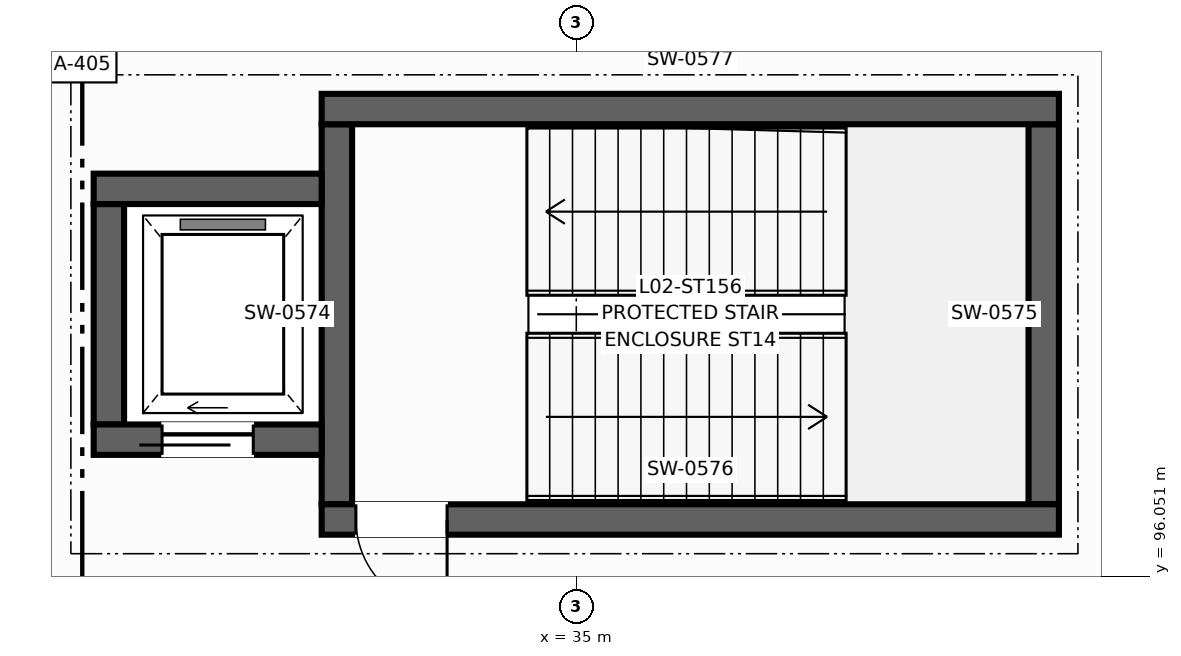
"""IFC4 building model, lengths in metres.
Left out: names, types, materials, properties, quantities, classifications, styles, units other than length and angle.
Written with IfcOpenShell. Run it as: python <this file> out.ifc"""

import sys

from ifc_helpers import new_model, si_unit, direction, frame, frame_2d, origin, place, context, subcontext, project, spatial, rectangle, extrude, element, fill, save


model = new_model("IFC4")
c1 = context("Model", 3, precision=1e-05, world=origin(), true_north=direction((0.0, 1.0)))
c2 = subcontext(c1, "Body", "Model", "MODEL_VIEW")
j1 = project(units=[si_unit("LENGTHUNIT", "METRE"), si_unit("PLANEANGLEUNIT", "RADIAN")], contexts=[c1])
p1 = place(None, origin())
s1 = spatial("IfcSite", under=j1, at=p1, CompositionType="ELEMENT")
p2 = place(p1, origin())
s2 = spatial("IfcBuilding", under=s1, at=p2, CompositionType="ELEMENT")
p3 = place(p2, frame((0.0, 0.0, 9.0)))
s3 = spatial("IfcBuildingStorey", under=s2, at=p3, CompositionType="ELEMENT", Elevation=9.0)
for number, where, z_axis, x_axis in (
    (1, (31.85, 97.0, 0.0), (0.0, 0.0, 1.0), (0.0, 1.0, 0.0)),
    (2, (41.15, 97.0, 0.0), (0.0, 0.0, 1.0), (0.0, 1.0, 0.0)),
):
    element("IfcWall", number, at=place(p3, frame(where, z_axis=z_axis, x_axis=x_axis)), inside=s3, PredefinedType="SHEAR", context=c2, shape_type="SweptSolid", body=[
        extrude(rectangle(XDim=5.0, YDim=0.4, at=frame_2d((2.5, 0.0))), origin(), (0.0, 0.0, 1.0), 4.185),
    ])
p4 = place(p3, frame((31.65, 96.8, 0.0), z_axis=(0.0, 0.0, 1.0), x_axis=(1.0, 0.0, 0.0)))
e3 = element("IfcWall", 3, at=p4, inside=s3, PredefinedType="SHEAR", context=c2, shape_type="SweptSolid", body=[
    extrude(rectangle(XDim=9.7, YDim=0.4, at=frame_2d((4.85, 0.0))), origin(), (0.0, 0.0, 1.0), 4.185),
])
p5 = place(p4, frame((0.45, 0.0, 0.0)))
e4 = element("IfcOpeningElement", 4, at=p5, cuts=e3, PredefinedType="OPENING", context=c2, shape_type="SweptSolid", body=[
    extrude(rectangle(XDim=1.2, YDim=2.2, at=frame_2d((0.6, 1.1))), frame((0.0, 0.21, 0.0), z_axis=(0.0, -1.0, 0.0), x_axis=(1.0, 0.0, 0.0)), (0.0, 0.0, 1.0), 0.42),
])
p6 = place(p3, frame((31.65, 102.2, 0.0), z_axis=(0.0, 0.0, 1.0), x_axis=(1.0, 0.0, 0.0)))
e5 = element("IfcWall", 5, at=p6, inside=s3, PredefinedType="SHEAR", context=c2, shape_type="SweptSolid", body=[
    extrude(rectangle(XDim=9.7, YDim=0.4, at=frame_2d((4.85, 0.0))), origin(), (0.0, 0.0, 1.0), 4.185),
])
p7 = place(p3, frame((28.85, 98.05, 0.0), z_axis=(0.0, 0.0, 1.0), x_axis=(0.0, 1.0, 0.0)))
e6 = element("IfcWall", 6, at=p7, inside=s3, PredefinedType="SHEAR", context=c2, shape_type="SweptSolid", body=[
    extrude(rectangle(XDim=2.9, YDim=0.4, at=frame_2d((1.45, 0.0))), origin(), (0.0, 0.0, 1.0), 4.185),
])
p8 = place(p3, frame((28.65, 97.85, 0.0), z_axis=(0.0, 0.0, 1.0), x_axis=(1.0, 0.0, 0.0)))
e7 = element("IfcWall", 7, at=p8, inside=s3, PredefinedType="SHEAR", context=c2, shape_type="SweptSolid", body=[
    extrude(rectangle(XDim=3.0, YDim=0.4, at=frame_2d((1.5, 0.0))), origin(), (0.0, 0.0, 1.0), 4.185),
])
p9 = place(p8, frame((0.9, 0.0, 0.0)))
e8 = element("IfcOpeningElement", 8, at=p9, cuts=e7, PredefinedType="OPENING", context=c2, shape_type="SweptSolid", body=[
    extrude(rectangle(XDim=1.2, YDim=2.2, at=frame_2d((0.6, 1.1))), frame((0.0, 0.21, 0.0), z_axis=(0.0, -1.0, 0.0), x_axis=(1.0, 0.0, 0.0)), (0.0, 0.0, 1.0), 0.42),
])
p10 = place(p3, frame((28.65, 101.15, 0.0), z_axis=(0.0, 0.0, 1.0), x_axis=(1.0, 0.0, 0.0)))
e9 = element("IfcWall", 9, at=p10, inside=s3, PredefinedType="SHEAR", context=c2, shape_type="SweptSolid", body=[
    extrude(rectangle(XDim=3.0, YDim=0.4, at=frame_2d((1.5, 0.0))), origin(), (0.0, 0.0, 1.0), 4.185),
])
p11 = place(p5, frame((1.2, 0.0, 0.0), z_axis=(0.0, 0.0, 1.0), x_axis=(-1.0, 0.0, 0.0)))
e10 = element("IfcDoor", 10, at=p11, inside=s3, OperationType="SINGLE_SWING_RIGHT", PredefinedType="DOOR", context=c2, shape_type="SweptSolid", body=[
    extrude(rectangle(XDim=1.2, YDim=2.2, at=frame_2d((0.6, 1.1))), frame((0.0, 0.025, 0.0), z_axis=(0.0, -1.0, 0.0), x_axis=(1.0, 0.0, 0.0)), (0.0, 0.0, 1.0), 0.05),
])
fill(e4, e10)
p12 = place(p9, origin())
e11 = element("IfcDoor", 11, at=p12, inside=s3, OperationType="SLIDING_TO_LEFT", PredefinedType="DOOR", context=c2, shape_type="SweptSolid", body=[
    extrude(rectangle(XDim=1.2, YDim=2.2, at=frame_2d((0.6, 1.1))), frame((0.0, 0.025, 0.0), z_axis=(0.0, -1.0, 0.0), x_axis=(1.0, 0.0, 0.0)), (0.0, 0.0, 1.0), 0.05),
])
fill(e8, e11)
save(model, sys.argv[1])
